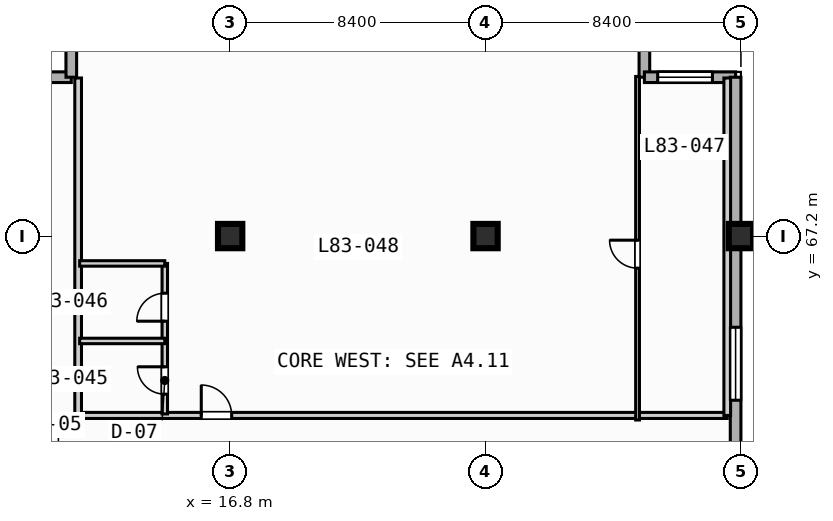
"""IFC4 building model, lengths in metres.
Left out: names, types, materials, properties, quantities, classifications, styles, units other than length and angle.
Written with IfcOpenShell. Run it as: python <this file> out.ifc"""

import sys

from ifc_helpers import new_model, si_unit, direction, frame, frame_2d, origin, origin_2d, place, context, subcontext, project, spatial, rectangle, extrude, element, fill, save


model = new_model("IFC4")
c1 = context("Model", 3, precision=1e-05, world=origin(), true_north=direction((0.0, 1.0)))
c2 = subcontext(c1, "Body", "Model", "MODEL_VIEW")
j1 = project(units=[si_unit("LENGTHUNIT", "METRE"), si_unit("PLANEANGLEUNIT", "RADIAN")], contexts=[c1])
p1 = place(None, origin())
s1 = spatial("IfcSite", under=j1, at=p1, CompositionType="ELEMENT")
p2 = place(p1, origin())
s2 = spatial("IfcBuilding", under=s1, at=p2, CompositionType="ELEMENT")
p3 = place(p2, frame((0.0, 0.0, 335.9)))
s3 = spatial("IfcBuildingStorey", under=s2, at=p3, CompositionType="ELEMENT", Elevation=335.9)
for number, where, z_axis, x_axis in (
    (1, (16.8, 67.2, 0.0), (0.0, 0.0, 1.0), (1.0, 0.0, 0.0)),
    (2, (25.2, 67.2, 0.0), (0.0, 0.0, 1.0), (1.0, 0.0, 0.0)),
    (3, (33.6, 67.2, 0.0), (0.0, 0.0, 1.0), (1.0, 0.0, 0.0)),
):
    element("IfcColumn", number, at=place(p3, frame(where, z_axis=z_axis, x_axis=x_axis)), inside=s3, PredefinedType="COLUMN", context=c2, shape_type="SweptSolid", body=[
        extrude(rectangle(XDim=0.8, YDim=0.8, at=origin_2d()), origin(), (0.0, 0.0, 1.0), 3.9),
    ])
for number, where, z_axis, x_axis in (
    (4, (8.575, 72.425, 0.0), (0.0, 0.0, 1.0), (1.0, 0.0, 0.0)),
    (5, (11.575, 72.425, 0.0), (0.0, 0.0, 1.0), (0.0, 1.0, 0.0)),
    (6, (30.425, 75.425, 0.0), (0.0, 0.0, 1.0), (0.0, -1.0, 0.0)),
):
    element("IfcWall", number, at=place(p3, frame(where, z_axis=z_axis, x_axis=x_axis)), inside=s3, PredefinedType="STANDARD", context=c2, shape_type="SweptSolid", body=[
        extrude(rectangle(XDim=3.0, YDim=0.35, at=frame_2d((1.5, 0.0))), origin(), (0.0, 0.0, 1.0), 3.67),
    ])
p4 = place(p3, frame((30.425, 72.425, 0.0), z_axis=(0.0, 0.0, 1.0), x_axis=(1.0, 0.0, 0.0)))
e7 = element("IfcWall", 7, at=p4, inside=s3, PredefinedType="STANDARD", context=c2, shape_type="SweptSolid", body=[
    extrude(rectangle(XDim=3.0, YDim=0.35, at=frame_2d((1.5, 0.0))), origin(), (0.0, 0.0, 1.0), 3.67),
])
p5 = place(p4, frame((0.438, 0.0, 0.85)))
e8 = element("IfcOpeningElement", 8, at=p5, cuts=e7, PredefinedType="OPENING", context=c2, shape_type="SweptSolid", body=[
    extrude(rectangle(XDim=1.8, YDim=1.8, at=frame_2d((0.9, 0.9))), frame((0.0, 0.185, 0.0), z_axis=(0.0, -1.0, 0.0), x_axis=(1.0, 0.0, 0.0)), (0.0, 0.0, 1.0), 0.37),
])
p6 = place(p3, frame((33.425, 72.425, 0.0), z_axis=(0.0, 0.0, 1.0), x_axis=(0.0, -1.0, 0.0)))
e9 = element("IfcWall", 9, at=p6, inside=s3, PredefinedType="STANDARD", context=c2, shape_type="SweptSolid", body=[
    extrude(rectangle(XDim=39.0, YDim=0.35, at=frame_2d((19.5, 0.0))), origin(), (0.0, 0.0, 1.0), 3.67),
])
p7 = place(p6, frame((33.725, 0.0, 0.85)))
e10 = element("IfcOpeningElement", 10, at=p7, cuts=e9, PredefinedType="OPENING", context=c2, shape_type="SweptSolid", body=[
    extrude(rectangle(XDim=1.8, YDim=1.8, at=frame_2d((0.9, 0.9))), frame((0.0, 0.185, 0.0), z_axis=(0.0, -1.0, 0.0), x_axis=(1.0, 0.0, 0.0)), (0.0, 0.0, 1.0), 0.37),
])
p8 = place(p6, frame((8.225, 0.0, 0.85)))
e11 = element("IfcOpeningElement", 11, at=p8, cuts=e9, PredefinedType="OPENING", context=c2, shape_type="SweptSolid", body=[
    extrude(rectangle(XDim=2.4, YDim=1.95, at=frame_2d((1.2, 0.975))), frame((0.0, 0.185, 0.0), z_axis=(0.0, -1.0, 0.0), x_axis=(1.0, 0.0, 0.0)), (0.0, 0.0, 1.0), 0.37),
])
p9 = place(p3, frame((11.8, 61.3, 0.0), z_axis=(0.0, 0.0, 1.0), x_axis=(1.0, 0.0, 0.0)))
e12 = element("IfcWall", 12, at=p9, inside=s3, PredefinedType="PARTITIONING", context=c2, shape_type="SweptSolid", body=[
    extrude(rectangle(XDim=21.35, YDim=0.2, at=frame_2d((10.675, 0.0))), origin(), (0.0, 0.0, 1.0), 3.67),
])
p10 = place(p9, frame((4.05, 0.0, 0.0)))
e13 = element("IfcOpeningElement", 13, at=p10, cuts=e12, PredefinedType="OPENING", context=c2, shape_type="SweptSolid", body=[
    extrude(rectangle(XDim=1.0, YDim=2.15, at=frame_2d((0.5, 1.075))), frame((0.0, 0.11, 0.0), z_axis=(0.0, -1.0, 0.0), x_axis=(1.0, 0.0, 0.0)), (0.0, 0.0, 1.0), 0.22),
])
for number, where, z_axis, x_axis in (
    (14, (33.15, 61.3, 0.0), (0.0, 0.0, 1.0), (0.0, 1.0, 0.0)),
    (15, (11.8, 61.3, 0.0), (0.0, 0.0, 1.0), (0.0, 1.0, 0.0)),
):
    element("IfcWall", number, at=place(p3, frame(where, z_axis=z_axis, x_axis=x_axis)), inside=s3, PredefinedType="PARTITIONING", context=c2, shape_type="SweptSolid", body=[
        extrude(rectangle(XDim=11.1, YDim=0.22, at=frame_2d((5.55, 0.0))), origin(), (0.0, 0.0, 1.0), 3.67),
    ])
p11 = place(p3, frame((14.65, 61.35, 0.0), z_axis=(0.0, 0.0, 1.0), x_axis=(0.0, 1.0, 0.0)))
e16 = element("IfcWall", 16, at=p11, inside=s3, PredefinedType="PLUMBINGWALL", context=c2, shape_type="SweptSolid", body=[
    extrude(rectangle(XDim=4.95, YDim=0.18, at=frame_2d((2.475, 0.0))), origin(), (0.0, 0.0, 1.0), 3.67),
])
p12 = place(p11, frame((0.65, 0.0, 0.0)))
e17 = element("IfcOpeningElement", 17, at=p12, cuts=e16, PredefinedType="OPENING", context=c2, shape_type="SweptSolid", body=[
    extrude(rectangle(XDim=0.9, YDim=2.1, at=frame_2d((0.45, 1.05))), frame((0.0, 0.1, 0.0), z_axis=(0.0, -1.0, 0.0), x_axis=(1.0, 0.0, 0.0)), (0.0, 0.0, 1.0), 0.2),
])
p13 = place(p11, frame((3.05, 0.0, 0.0)))
e18 = element("IfcOpeningElement", 18, at=p13, cuts=e16, PredefinedType="OPENING", context=c2, shape_type="SweptSolid", body=[
    extrude(rectangle(XDim=0.92, YDim=2.1, at=frame_2d((0.46, 1.05))), frame((0.0, 0.1, 0.0), z_axis=(0.0, -1.0, 0.0), x_axis=(1.0, 0.0, 0.0)), (0.0, 0.0, 1.0), 0.2),
])
for number, where, z_axis, x_axis in (
    (19, (11.85, 63.75, 0.0), (0.0, 0.0, 1.0), (1.0, 0.0, 0.0)),
    (20, (11.85, 66.3, 0.0), (0.0, 0.0, 1.0), (1.0, 0.0, 0.0)),
):
    element("IfcWall", number, at=place(p3, frame(where, z_axis=z_axis, x_axis=x_axis)), inside=s3, PredefinedType="PLUMBINGWALL", context=c2, shape_type="SweptSolid", body=[
        extrude(rectangle(XDim=2.8, YDim=0.18, at=frame_2d((1.4, 0.0))), origin(), (0.0, 0.0, 1.0), 3.67),
    ])
p14 = place(p3, frame((30.2, 61.15, 0.0), z_axis=(0.0, 0.0, 1.0), x_axis=(0.0, 1.0, 0.0)))
e21 = element("IfcWall", 21, at=p14, inside=s3, PredefinedType="PARTITIONING", context=c2, shape_type="SweptSolid", body=[
    extrude(rectangle(XDim=11.3, YDim=0.125, at=frame_2d((5.65, 0.0))), origin(), (0.0, 0.0, 1.0), 3.67),
])
p15 = place(p14, frame((4.995, 0.0, 0.0)))
e22 = element("IfcOpeningElement", 22, at=p15, cuts=e21, PredefinedType="OPENING", context=c2, shape_type="SweptSolid", body=[
    extrude(rectangle(XDim=0.92, YDim=2.1, at=frame_2d((0.46, 1.05))), frame((0.0, 0.073, 0.0), z_axis=(0.0, -1.0, 0.0), x_axis=(1.0, 0.0, 0.0)), (0.0, 0.0, 1.0), 0.145),
])
p16 = place(p5, origin())
e23 = element("IfcWindow", 23, at=p16, inside=s3, PartitioningType="SINGLE_PANEL", PredefinedType="WINDOW", context=c2, shape_type="SweptSolid", body=[
    extrude(rectangle(XDim=1.8, YDim=1.8, at=frame_2d((0.9, 0.9))), frame((0.0, 0.03, 0.0), z_axis=(0.0, -1.0, 0.0), x_axis=(1.0, 0.0, 0.0)), (0.0, 0.0, 1.0), 0.06),
])
fill(e8, e23)
p17 = place(p8, origin())
e24 = element("IfcWindow", 24, at=p17, inside=s3, PartitioningType="SINGLE_PANEL", PredefinedType="WINDOW", context=c2, shape_type="SweptSolid", body=[
    extrude(rectangle(XDim=2.4, YDim=1.95, at=frame_2d((1.2, 0.975))), frame((0.0, 0.03, 0.0), z_axis=(0.0, -1.0, 0.0), x_axis=(1.0, 0.0, 0.0)), (0.0, 0.0, 1.0), 0.06),
])
fill(e11, e24)
p18 = place(p10, origin())
e25 = element("IfcDoor", 25, at=p18, inside=s3, OperationType="SINGLE_SWING_LEFT", PredefinedType="DOOR", context=c2, shape_type="SweptSolid", body=[
    extrude(rectangle(XDim=1.0, YDim=2.15, at=frame_2d((0.5, 1.075))), frame((0.0, 0.025, 0.0), z_axis=(0.0, -1.0, 0.0), x_axis=(1.0, 0.0, 0.0)), (0.0, 0.0, 1.0), 0.05),
])
fill(e13, e25)
p19 = place(p12, origin())
e26 = element("IfcDoor", 26, at=p19, inside=s3, OperationType="SINGLE_SWING_RIGHT", PredefinedType="DOOR", context=c2, shape_type="SweptSolid", body=[
    extrude(rectangle(XDim=0.9, YDim=2.1, at=frame_2d((0.45, 1.05))), frame((0.0, 0.025, 0.0), z_axis=(0.0, -1.0, 0.0), x_axis=(1.0, 0.0, 0.0)), (0.0, 0.0, 1.0), 0.05),
])
fill(e17, e26)
p20 = place(p13, origin())
e27 = element("IfcDoor", 27, at=p20, inside=s3, OperationType="SINGLE_SWING_LEFT", PredefinedType="DOOR", context=c2, shape_type="SweptSolid", body=[
    extrude(rectangle(XDim=0.92, YDim=2.1, at=frame_2d((0.46, 1.05))), frame((0.0, 0.025, 0.0), z_axis=(0.0, -1.0, 0.0), x_axis=(1.0, 0.0, 0.0)), (0.0, 0.0, 1.0), 0.05),
])
fill(e18, e27)
p21 = place(p15, origin())
e28 = element("IfcDoor", 28, at=p21, inside=s3, OperationType="SINGLE_SWING_RIGHT", PredefinedType="DOOR", context=c2, shape_type="SweptSolid", body=[
    extrude(rectangle(XDim=0.92, YDim=2.1, at=frame_2d((0.46, 1.05))), frame((0.0, 0.025, 0.0), z_axis=(0.0, -1.0, 0.0), x_axis=(1.0, 0.0, 0.0)), (0.0, 0.0, 1.0), 0.05),
])
fill(e22, e28)
save(model, sys.argv[1])
